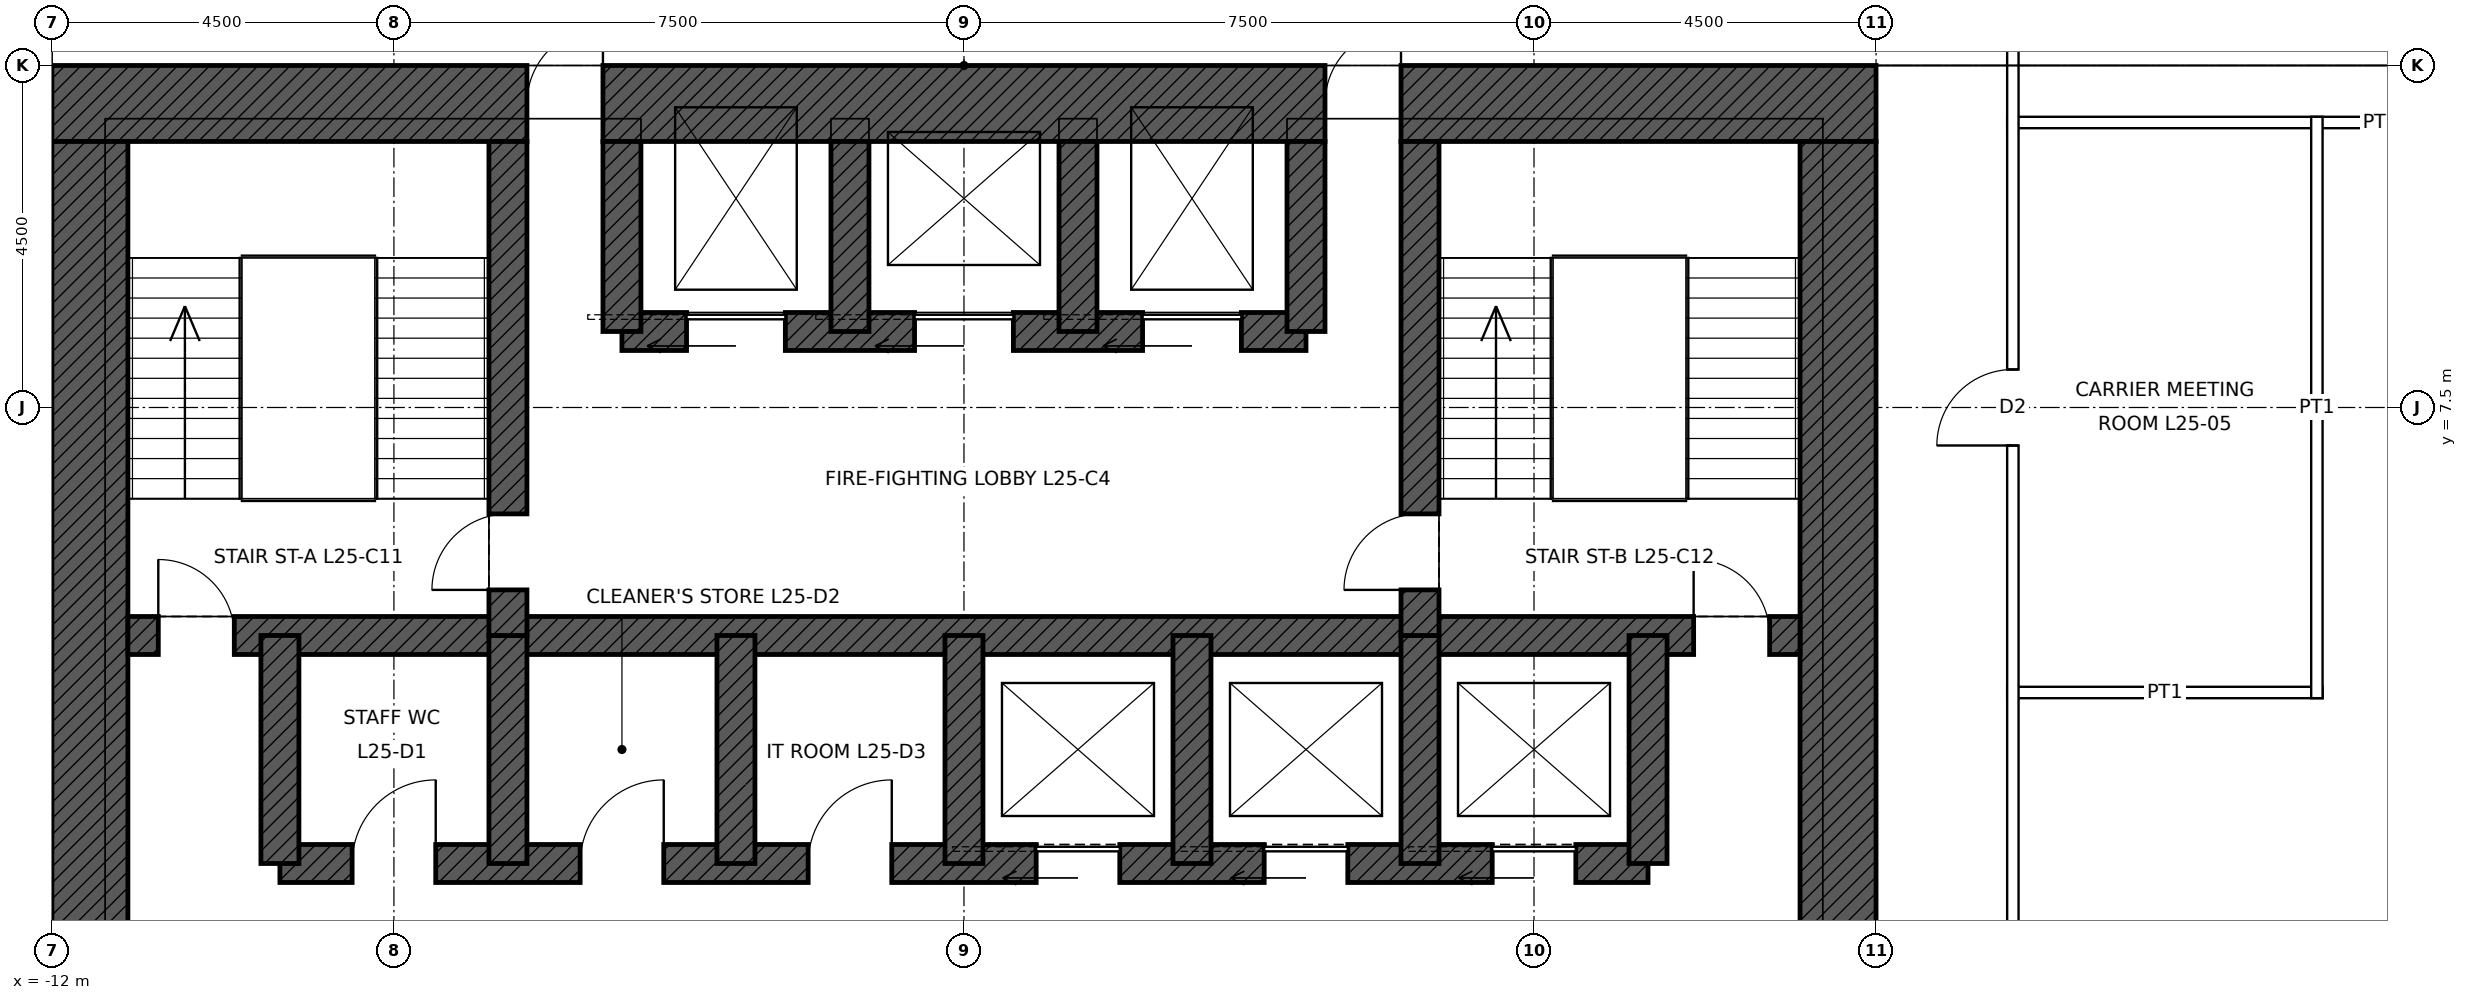
"""IFC4 building model, lengths in metres.
Left out: names, types, materials, properties, quantities, classifications, styles, units other than length and angle.
Written with IfcOpenShell. Run it as: python <this file> out.ifc"""

import sys

from ifc_helpers import new_model, si_unit, direction, frame, frame_2d, origin, place, context, subcontext, project, spatial, rectangle, extrude, element, fill, save


model = new_model("IFC4")
c1 = context("Model", 3, precision=1e-05, world=origin(), true_north=direction((0.0, 1.0)))
c2 = subcontext(c1, "Body", "Model", "MODEL_VIEW")
j1 = project(units=[si_unit("LENGTHUNIT", "METRE"), si_unit("PLANEANGLEUNIT", "RADIAN")], contexts=[c1])
p1 = place(None, origin())
s1 = spatial("IfcSite", under=j1, at=p1, CompositionType="ELEMENT")
p2 = place(p1, origin())
s2 = spatial("IfcBuilding", under=s1, at=p2, CompositionType="ELEMENT")
p3 = place(p2, frame((0.0, 0.0, 126.9)))
s3 = spatial("IfcBuildingStorey", under=s2, at=p3, CompositionType="ELEMENT", Elevation=126.9)
p4 = place(p3, frame((-12.0, 11.5, 0.0), z_axis=(0.0, 0.0, 1.0), x_axis=(1.0, 0.0, 0.0)))
e1 = element("IfcWall", 1, at=p4, inside=s3, PredefinedType="SHEAR", context=c2, shape_type="SweptSolid", body=[
    extrude(rectangle(XDim=24.0, YDim=1.0, at=frame_2d((12.0, 0.0))), origin(), (0.0, 0.0, 1.0), 4.5),
])
p5 = place(p4, frame((6.25, 0.0, 0.0)))
e2 = element("IfcOpeningElement", 2, at=p5, cuts=e1, PredefinedType="OPENING", context=c2, shape_type="SweptSolid", body=[
    extrude(rectangle(XDim=1.0, YDim=2.4, at=frame_2d((0.5, 1.2))), frame((0.0, 0.51, 0.0), z_axis=(0.0, -1.0, 0.0), x_axis=(1.0, 0.0, 0.0)), (0.0, 0.0, 1.0), 1.02),
])
p6 = place(p4, frame((16.75, 0.0, 0.0)))
e3 = element("IfcOpeningElement", 3, at=p6, cuts=e1, PredefinedType="OPENING", context=c2, shape_type="SweptSolid", body=[
    extrude(rectangle(XDim=1.0, YDim=2.4, at=frame_2d((0.5, 1.2))), frame((0.0, 0.51, 0.0), z_axis=(0.0, -1.0, 0.0), x_axis=(1.0, 0.0, 0.0)), (0.0, 0.0, 1.0), 1.02),
])
p7 = place(p3, frame((11.5, 11.0, 0.0), z_axis=(0.0, 0.0, 1.0), x_axis=(0.0, -1.0, 0.0)))
e4 = element("IfcWall", 4, at=p7, inside=s3, PredefinedType="SHEAR", context=c2, shape_type="SweptSolid", body=[
    extrude(rectangle(XDim=22.0, YDim=1.0, at=frame_2d((11.0, 0.0))), origin(), (0.0, 0.0, 1.0), 4.5),
])
p8 = place(p7, frame((10.5, 0.0, 0.0)))
e5 = element("IfcOpeningElement", 5, at=p8, cuts=e4, PredefinedType="OPENING", context=c2, shape_type="SweptSolid", body=[
    extrude(rectangle(XDim=1.0, YDim=2.4, at=frame_2d((0.5, 1.2))), frame((0.0, 0.51, 0.0), z_axis=(0.0, -1.0, 0.0), x_axis=(1.0, 0.0, 0.0)), (0.0, 0.0, 1.0), 1.02),
])
p9 = place(p3, frame((-11.5, -11.0, 0.0), z_axis=(0.0, 0.0, 1.0), x_axis=(0.0, 1.0, 0.0)))
e6 = element("IfcWall", 6, at=p9, inside=s3, PredefinedType="SHEAR", context=c2, shape_type="SweptSolid", body=[
    extrude(rectangle(XDim=22.0, YDim=1.0, at=frame_2d((11.0, 0.0))), origin(), (0.0, 0.0, 1.0), 4.5),
])
p10 = place(p9, frame((10.5, 0.0, 0.0)))
e7 = element("IfcOpeningElement", 7, at=p10, cuts=e6, PredefinedType="OPENING", context=c2, shape_type="SweptSolid", body=[
    extrude(rectangle(XDim=1.0, YDim=2.4, at=frame_2d((0.5, 1.2))), frame((0.0, 0.51, 0.0), z_axis=(0.0, -1.0, 0.0), x_axis=(1.0, 0.0, 0.0)), (0.0, 0.0, 1.0), 1.02),
])
p11 = place(p3, frame((-11.0, 4.5, 0.0), z_axis=(0.0, 0.0, 1.0), x_axis=(1.0, 0.0, 0.0)))
e8 = element("IfcWall", 8, at=p11, inside=s3, PredefinedType="SHEAR", context=c2, shape_type="SweptSolid", body=[
    extrude(rectangle(XDim=22.0, YDim=0.5, at=frame_2d((11.0, 0.0))), origin(), (0.0, 0.0, 1.0), 4.5),
])
p12 = place(p11, frame((0.4, 0.0, 0.0)))
e9 = element("IfcOpeningElement", 9, at=p12, cuts=e8, PredefinedType="OPENING", context=c2, shape_type="SweptSolid", body=[
    extrude(rectangle(XDim=1.0, YDim=2.1, at=frame_2d((0.5, 1.05))), frame((0.0, 0.26, 0.0), z_axis=(0.0, -1.0, 0.0), x_axis=(1.0, 0.0, 0.0)), (0.0, 0.0, 1.0), 0.52),
])
p13 = place(p11, frame((20.6, 0.0, 0.0)))
e10 = element("IfcOpeningElement", 10, at=p13, cuts=e8, PredefinedType="OPENING", context=c2, shape_type="SweptSolid", body=[
    extrude(rectangle(XDim=1.0, YDim=2.1, at=frame_2d((0.5, 1.05))), frame((0.0, 0.26, 0.0), z_axis=(0.0, -1.0, 0.0), x_axis=(1.0, 0.0, 0.0)), (0.0, 0.0, 1.0), 0.52),
])
p14 = place(p3, frame((-9.0, 1.5, 0.0), z_axis=(0.0, 0.0, 1.0), x_axis=(1.0, 0.0, 0.0)))
e11 = element("IfcWall", 11, at=p14, inside=s3, PredefinedType="SHEAR", context=c2, shape_type="SweptSolid", body=[
    extrude(rectangle(XDim=18.0, YDim=0.5, at=frame_2d((9.0, 0.0))), origin(), (0.0, 0.0, 1.0), 4.5),
])
p15 = place(p14, frame((9.95, 0.0, 0.0)))
e12 = element("IfcOpeningElement", 12, at=p15, cuts=e11, PredefinedType="OPENING", context=c2, shape_type="SweptSolid", body=[
    extrude(rectangle(XDim=1.1, YDim=2.1, at=frame_2d((0.55, 1.05))), frame((0.0, 0.26, 0.0), z_axis=(0.0, -1.0, 0.0), x_axis=(1.0, 0.0, 0.0)), (0.0, 0.0, 1.0), 0.52),
])
p16 = place(p14, frame((12.95, 0.0, 0.0)))
e13 = element("IfcOpeningElement", 13, at=p16, cuts=e11, PredefinedType="OPENING", context=c2, shape_type="SweptSolid", body=[
    extrude(rectangle(XDim=1.1, YDim=2.1, at=frame_2d((0.55, 1.05))), frame((0.0, 0.26, 0.0), z_axis=(0.0, -1.0, 0.0), x_axis=(1.0, 0.0, 0.0)), (0.0, 0.0, 1.0), 0.52),
])
p17 = place(p14, frame((15.95, 0.0, 0.0)))
e14 = element("IfcOpeningElement", 14, at=p17, cuts=e11, PredefinedType="OPENING", context=c2, shape_type="SweptSolid", body=[
    extrude(rectangle(XDim=1.1, YDim=2.1, at=frame_2d((0.55, 1.05))), frame((0.0, 0.26, 0.0), z_axis=(0.0, -1.0, 0.0), x_axis=(1.0, 0.0, 0.0)), (0.0, 0.0, 1.0), 0.52),
])
p18 = place(p14, frame((0.95, 0.0, 0.0)))
e15 = element("IfcOpeningElement", 15, at=p18, cuts=e11, PredefinedType="OPENING", context=c2, shape_type="SweptSolid", body=[
    extrude(rectangle(XDim=1.1, YDim=2.1, at=frame_2d((0.55, 1.05))), frame((0.0, 0.26, 0.0), z_axis=(0.0, -1.0, 0.0), x_axis=(1.0, 0.0, 0.0)), (0.0, 0.0, 1.0), 0.52),
])
p19 = place(p14, frame((3.95, 0.0, 0.0)))
e16 = element("IfcOpeningElement", 16, at=p19, cuts=e11, PredefinedType="OPENING", context=c2, shape_type="SweptSolid", body=[
    extrude(rectangle(XDim=1.1, YDim=2.1, at=frame_2d((0.55, 1.05))), frame((0.0, 0.26, 0.0), z_axis=(0.0, -1.0, 0.0), x_axis=(1.0, 0.0, 0.0)), (0.0, 0.0, 1.0), 0.52),
])
p20 = place(p14, frame((6.95, 0.0, 0.0)))
e17 = element("IfcOpeningElement", 17, at=p20, cuts=e11, PredefinedType="OPENING", context=c2, shape_type="SweptSolid", body=[
    extrude(rectangle(XDim=1.1, YDim=2.1, at=frame_2d((0.55, 1.05))), frame((0.0, 0.26, 0.0), z_axis=(0.0, -1.0, 0.0), x_axis=(1.0, 0.0, 0.0)), (0.0, 0.0, 1.0), 0.52),
])
p21 = place(p3, frame((-4.5, 8.5, 0.0), z_axis=(0.0, 0.0, 1.0), x_axis=(1.0, 0.0, 0.0)))
e18 = element("IfcWall", 18, at=p21, inside=s3, PredefinedType="SHEAR", context=c2, shape_type="SweptSolid", body=[
    extrude(rectangle(XDim=9.0, YDim=0.5, at=frame_2d((4.5, 0.0))), origin(), (0.0, 0.0, 1.0), 4.5),
])
p22 = place(p21, frame((0.85, 0.0, 0.0)))
e19 = element("IfcOpeningElement", 19, at=p22, cuts=e18, PredefinedType="OPENING", context=c2, shape_type="SweptSolid", body=[
    extrude(rectangle(XDim=1.3, YDim=2.4, at=frame_2d((0.65, 1.2))), frame((0.0, 0.26, 0.0), z_axis=(0.0, -1.0, 0.0), x_axis=(1.0, 0.0, 0.0)), (0.0, 0.0, 1.0), 0.52),
])
p23 = place(p21, frame((6.85, 0.0, 0.0)))
e20 = element("IfcOpeningElement", 20, at=p23, cuts=e18, PredefinedType="OPENING", context=c2, shape_type="SweptSolid", body=[
    extrude(rectangle(XDim=1.3, YDim=2.4, at=frame_2d((0.65, 1.2))), frame((0.0, 0.26, 0.0), z_axis=(0.0, -1.0, 0.0), x_axis=(1.0, 0.0, 0.0)), (0.0, 0.0, 1.0), 0.52),
])
p24 = place(p21, frame((3.85, 0.0, 0.0)))
e21 = element("IfcOpeningElement", 21, at=p24, cuts=e18, PredefinedType="OPENING", context=c2, shape_type="SweptSolid", body=[
    extrude(rectangle(XDim=1.3, YDim=2.4, at=frame_2d((0.65, 1.2))), frame((0.0, 0.26, 0.0), z_axis=(0.0, -1.0, 0.0), x_axis=(1.0, 0.0, 0.0)), (0.0, 0.0, 1.0), 0.52),
])
for number, where, z_axis, x_axis in (
    (22, (-9.0, 1.5, 0.0), (0.0, 0.0, 1.0), (0.0, 1.0, 0.0)),
    (23, (9.0, 1.5, 0.0), (0.0, 0.0, 1.0), (0.0, 1.0, 0.0)),
    (24, (-6.0, 1.5, 0.0), (0.0, 0.0, 1.0), (0.0, 1.0, 0.0)),
    (25, (-3.0, 1.5, 0.0), (0.0, 0.0, 1.0), (0.0, 1.0, 0.0)),
    (26, (0.0, 1.5, 0.0), (0.0, 0.0, 1.0), (0.0, 1.0, 0.0)),
    (27, (3.0, 1.5, 0.0), (0.0, 0.0, 1.0), (0.0, 1.0, 0.0)),
    (28, (6.0, 1.5, 0.0), (0.0, 0.0, 1.0), (0.0, 1.0, 0.0)),
):
    element("IfcWall", number, at=place(p3, frame(where, z_axis=z_axis, x_axis=x_axis)), inside=s3, PredefinedType="SHEAR", context=c2, shape_type="SweptSolid", body=[
        extrude(rectangle(XDim=3.0, YDim=0.5, at=frame_2d((1.5, 0.0))), origin(), (0.0, 0.0, 1.0), 4.5),
    ])
p25 = place(p3, frame((-6.0, 4.5, 0.0), z_axis=(0.0, 0.0, 1.0), x_axis=(0.0, 1.0, 0.0)))
e29 = element("IfcWall", 29, at=p25, inside=s3, PredefinedType="SHEAR", context=c2, shape_type="SweptSolid", body=[
    extrude(rectangle(XDim=6.5, YDim=0.5, at=frame_2d((3.25, 0.0))), origin(), (0.0, 0.0, 1.0), 4.5),
])
p26 = place(p25, frame((0.6, 0.0, 0.0)))
e30 = element("IfcOpeningElement", 30, at=p26, cuts=e29, PredefinedType="OPENING", context=c2, shape_type="SweptSolid", body=[
    extrude(rectangle(XDim=1.0, YDim=2.1, at=frame_2d((0.5, 1.05))), frame((0.0, 0.26, 0.0), z_axis=(0.0, -1.0, 0.0), x_axis=(1.0, 0.0, 0.0)), (0.0, 0.0, 1.0), 0.52),
])
p27 = place(p3, frame((6.0, 4.5, 0.0), z_axis=(0.0, 0.0, 1.0), x_axis=(0.0, 1.0, 0.0)))
e31 = element("IfcWall", 31, at=p27, inside=s3, PredefinedType="SHEAR", context=c2, shape_type="SweptSolid", body=[
    extrude(rectangle(XDim=6.5, YDim=0.5, at=frame_2d((3.25, 0.0))), origin(), (0.0, 0.0, 1.0), 4.5),
])
p28 = place(p27, frame((0.6, 0.0, 0.0)))
e32 = element("IfcOpeningElement", 32, at=p28, cuts=e31, PredefinedType="OPENING", context=c2, shape_type="SweptSolid", body=[
    extrude(rectangle(XDim=1.0, YDim=2.1, at=frame_2d((0.5, 1.05))), frame((0.0, 0.26, 0.0), z_axis=(0.0, -1.0, 0.0), x_axis=(1.0, 0.0, 0.0)), (0.0, 0.0, 1.0), 0.52),
])
for number, where, z_axis, x_axis in (
    (33, (-4.5, 8.5, 0.0), (0.0, 0.0, 1.0), (0.0, 1.0, 0.0)),
    (34, (4.5, 8.5, 0.0), (0.0, 0.0, 1.0), (0.0, 1.0, 0.0)),
    (35, (-1.5, 8.5, 0.0), (0.0, 0.0, 1.0), (0.0, 1.0, 0.0)),
    (36, (1.5, 8.5, 0.0), (0.0, 0.0, 1.0), (0.0, 1.0, 0.0)),
):
    element("IfcWall", number, at=place(p3, frame(where, z_axis=z_axis, x_axis=x_axis)), inside=s3, PredefinedType="SHEAR", context=c2, shape_type="SweptSolid", body=[
        extrude(rectangle(XDim=2.5, YDim=0.5, at=frame_2d((1.25, 0.0))), origin(), (0.0, 0.0, 1.0), 4.5),
    ])
p29 = place(p3, frame((13.725, 3.75, 0.0), z_axis=(0.0, 0.0, 1.0), x_axis=(1.0, 0.0, 0.0)))
e37 = element("IfcWall", 37, at=p29, inside=s3, PredefinedType="PARTITIONING", context=c2, shape_type="SweptSolid", body=[
    extrude(rectangle(XDim=4.15, YDim=0.15, at=frame_2d((2.075, 0.0))), origin(), (0.0, 0.0, 1.0), 3.431),
])
p30 = place(p3, frame((13.725, 11.25, 0.0), z_axis=(0.0, 0.0, 1.0), x_axis=(1.0, 0.0, 0.0)))
e38 = element("IfcWall", 38, at=p30, inside=s3, PredefinedType="PARTITIONING", context=c2, shape_type="SweptSolid", body=[
    extrude(rectangle(XDim=9.825, YDim=0.15, at=frame_2d((4.913, 0.0))), origin(), (0.0, 0.0, 1.0), 3.431),
])
p31 = place(p3, frame((13.8, -13.875, 0.0), z_axis=(0.0, 0.0, 1.0), x_axis=(0.0, 1.0, 0.0)))
e39 = element("IfcWall", 39, at=p31, inside=s3, PredefinedType="PARTITIONING", context=c2, shape_type="SweptSolid", body=[
    extrude(rectangle(XDim=27.75, YDim=0.15, at=frame_2d((13.875, 0.0))), origin(), (0.0, 0.0, 1.0), 4.3),
])
p32 = place(p31, frame((20.875, 0.0, 0.0)))
e40 = element("IfcOpeningElement", 40, at=p32, cuts=e39, PredefinedType="OPENING", context=c2, shape_type="SweptSolid", body=[
    extrude(rectangle(XDim=1.0, YDim=2.1, at=frame_2d((0.5, 1.05))), frame((0.0, 0.085, 0.0), z_axis=(0.0, -1.0, 0.0), x_axis=(1.0, 0.0, 0.0)), (0.0, 0.0, 1.0), 0.17),
])
p33 = place(p31, frame((9.225, 0.0, 0.0)))
e41 = element("IfcOpeningElement", 41, at=p33, cuts=e39, PredefinedType="OPENING", context=c2, shape_type="SweptSolid", body=[
    extrude(rectangle(XDim=1.8, YDim=2.4, at=frame_2d((0.9, 1.2))), frame((0.0, 0.085, 0.0), z_axis=(0.0, -1.0, 0.0), x_axis=(1.0, 0.0, 0.0)), (0.0, 0.0, 1.0), 0.17),
])
p34 = place(p3, frame((17.8, 3.675, 0.0), z_axis=(0.0, 0.0, 1.0), x_axis=(0.0, 1.0, 0.0)))
e42 = element("IfcWall", 42, at=p34, inside=s3, PredefinedType="PARTITIONING", context=c2, shape_type="SweptSolid", body=[
    extrude(rectangle(XDim=7.65, YDim=0.15, at=frame_2d((3.825, 0.0))), origin(), (0.0, 0.0, 1.0), 4.3),
])
p35 = place(p12, origin())
e43 = element("IfcDoor", 43, at=p35, inside=s3, OperationType="SINGLE_SWING_LEFT", PredefinedType="DOOR", context=c2, shape_type="SweptSolid", body=[
    extrude(rectangle(XDim=1.0, YDim=2.1, at=frame_2d((0.5, 1.05))), frame((0.0, 0.025, 0.0), z_axis=(0.0, -1.0, 0.0), x_axis=(1.0, 0.0, 0.0)), (0.0, 0.0, 1.0), 0.05),
])
fill(e9, e43)
p36 = place(p13, origin())
e44 = element("IfcDoor", 44, at=p36, inside=s3, OperationType="SINGLE_SWING_LEFT", PredefinedType="DOOR", context=c2, shape_type="SweptSolid", body=[
    extrude(rectangle(XDim=1.0, YDim=2.1, at=frame_2d((0.5, 1.05))), frame((0.0, 0.025, 0.0), z_axis=(0.0, -1.0, 0.0), x_axis=(1.0, 0.0, 0.0)), (0.0, 0.0, 1.0), 0.05),
])
fill(e10, e44)
p37 = place(p26, origin())
e45 = element("IfcDoor", 45, at=p37, inside=s3, OperationType="SINGLE_SWING_LEFT", PredefinedType="DOOR", context=c2, shape_type="SweptSolid", body=[
    extrude(rectangle(XDim=1.0, YDim=2.1, at=frame_2d((0.5, 1.05))), frame((0.0, 0.025, 0.0), z_axis=(0.0, -1.0, 0.0), x_axis=(1.0, 0.0, 0.0)), (0.0, 0.0, 1.0), 0.05),
])
fill(e30, e45)
p38 = place(p28, origin())
e46 = element("IfcDoor", 46, at=p38, inside=s3, OperationType="SINGLE_SWING_LEFT", PredefinedType="DOOR", context=c2, shape_type="SweptSolid", body=[
    extrude(rectangle(XDim=1.0, YDim=2.1, at=frame_2d((0.5, 1.05))), frame((0.0, 0.025, 0.0), z_axis=(0.0, -1.0, 0.0), x_axis=(1.0, 0.0, 0.0)), (0.0, 0.0, 1.0), 0.05),
])
fill(e32, e46)
p39 = place(p5, origin())
e47 = element("IfcDoor", 47, at=p39, inside=s3, OperationType="SINGLE_SWING_RIGHT", PredefinedType="DOOR", context=c2, shape_type="SweptSolid", body=[
    extrude(rectangle(XDim=1.0, YDim=2.4, at=frame_2d((0.5, 1.2))), frame((0.0, 0.485, 0.0), z_axis=(0.0, -1.0, 0.0), x_axis=(1.0, 0.0, 0.0)), (0.0, 0.0, 1.0), 0.05),
])
fill(e2, e47)
p40 = place(p6, origin())
e48 = element("IfcDoor", 48, at=p40, inside=s3, OperationType="SINGLE_SWING_RIGHT", PredefinedType="DOOR", context=c2, shape_type="SweptSolid", body=[
    extrude(rectangle(XDim=1.0, YDim=2.4, at=frame_2d((0.5, 1.2))), frame((0.0, 0.485, 0.0), z_axis=(0.0, -1.0, 0.0), x_axis=(1.0, 0.0, 0.0)), (0.0, 0.0, 1.0), 0.05),
])
fill(e3, e48)
p41 = place(p22, origin())
e49 = element("IfcDoor", 49, at=p41, inside=s3, OperationType="SLIDING_TO_LEFT", PredefinedType="DOOR", context=c2, shape_type="SweptSolid", body=[
    extrude(rectangle(XDim=1.3, YDim=2.4, at=frame_2d((0.65, 1.2))), frame((0.0, 0.025, 0.0), z_axis=(0.0, -1.0, 0.0), x_axis=(1.0, 0.0, 0.0)), (0.0, 0.0, 1.0), 0.05),
])
fill(e19, e49)
p42 = place(p23, origin())
e50 = element("IfcDoor", 50, at=p42, inside=s3, OperationType="SLIDING_TO_LEFT", PredefinedType="DOOR", context=c2, shape_type="SweptSolid", body=[
    extrude(rectangle(XDim=1.3, YDim=2.4, at=frame_2d((0.65, 1.2))), frame((0.0, 0.025, 0.0), z_axis=(0.0, -1.0, 0.0), x_axis=(1.0, 0.0, 0.0)), (0.0, 0.0, 1.0), 0.05),
])
fill(e20, e50)
p43 = place(p24, origin())
e51 = element("IfcDoor", 51, at=p43, inside=s3, OperationType="SLIDING_TO_LEFT", PredefinedType="DOOR", context=c2, shape_type="SweptSolid", body=[
    extrude(rectangle(XDim=1.3, YDim=2.4, at=frame_2d((0.65, 1.2))), frame((0.0, 0.025, 0.0), z_axis=(0.0, -1.0, 0.0), x_axis=(1.0, 0.0, 0.0)), (0.0, 0.0, 1.0), 0.05),
])
fill(e21, e51)
p44 = place(p15, origin())
e52 = element("IfcDoor", 52, at=p44, inside=s3, OperationType="SLIDING_TO_LEFT", PredefinedType="DOOR", context=c2, shape_type="SweptSolid", body=[
    extrude(rectangle(XDim=1.1, YDim=2.1, at=frame_2d((0.55, 1.05))), frame((0.0, 0.025, 0.0), z_axis=(0.0, -1.0, 0.0), x_axis=(1.0, 0.0, 0.0)), (0.0, 0.0, 1.0), 0.05),
])
fill(e12, e52)
p45 = place(p16, origin())
e53 = element("IfcDoor", 53, at=p45, inside=s3, OperationType="SLIDING_TO_LEFT", PredefinedType="DOOR", context=c2, shape_type="SweptSolid", body=[
    extrude(rectangle(XDim=1.1, YDim=2.1, at=frame_2d((0.55, 1.05))), frame((0.0, 0.025, 0.0), z_axis=(0.0, -1.0, 0.0), x_axis=(1.0, 0.0, 0.0)), (0.0, 0.0, 1.0), 0.05),
])
fill(e13, e53)
p46 = place(p17, origin())
e54 = element("IfcDoor", 54, at=p46, inside=s3, OperationType="SLIDING_TO_LEFT", PredefinedType="DOOR", context=c2, shape_type="SweptSolid", body=[
    extrude(rectangle(XDim=1.1, YDim=2.1, at=frame_2d((0.55, 1.05))), frame((0.0, 0.025, 0.0), z_axis=(0.0, -1.0, 0.0), x_axis=(1.0, 0.0, 0.0)), (0.0, 0.0, 1.0), 0.05),
])
fill(e14, e54)
p47 = place(p18, origin())
e55 = element("IfcDoor", 55, at=p47, inside=s3, OperationType="SINGLE_SWING_RIGHT", PredefinedType="DOOR", context=c2, shape_type="SweptSolid", body=[
    extrude(rectangle(XDim=1.1, YDim=2.1, at=frame_2d((0.55, 1.05))), frame((0.0, 0.025, 0.0), z_axis=(0.0, -1.0, 0.0), x_axis=(1.0, 0.0, 0.0)), (0.0, 0.0, 1.0), 0.05),
])
fill(e15, e55)
p48 = place(p19, origin())
e56 = element("IfcDoor", 56, at=p48, inside=s3, OperationType="SINGLE_SWING_RIGHT", PredefinedType="DOOR", context=c2, shape_type="SweptSolid", body=[
    extrude(rectangle(XDim=1.1, YDim=2.1, at=frame_2d((0.55, 1.05))), frame((0.0, 0.025, 0.0), z_axis=(0.0, -1.0, 0.0), x_axis=(1.0, 0.0, 0.0)), (0.0, 0.0, 1.0), 0.05),
])
fill(e16, e56)
p49 = place(p20, origin())
e57 = element("IfcDoor", 57, at=p49, inside=s3, OperationType="SINGLE_SWING_RIGHT", PredefinedType="DOOR", context=c2, shape_type="SweptSolid", body=[
    extrude(rectangle(XDim=1.1, YDim=2.1, at=frame_2d((0.55, 1.05))), frame((0.0, 0.025, 0.0), z_axis=(0.0, -1.0, 0.0), x_axis=(1.0, 0.0, 0.0)), (0.0, 0.0, 1.0), 0.05),
])
fill(e17, e57)
p50 = place(p32, origin())
e58 = element("IfcDoor", 58, at=p50, inside=s3, OperationType="SINGLE_SWING_LEFT", PredefinedType="DOOR", context=c2, shape_type="SweptSolid", body=[
    extrude(rectangle(XDim=1.0, YDim=2.1, at=frame_2d((0.5, 1.05))), frame((0.0, 0.025, 0.0), z_axis=(0.0, -1.0, 0.0), x_axis=(1.0, 0.0, 0.0)), (0.0, 0.0, 1.0), 0.05),
])
fill(e40, e58)
save(model, sys.argv[1])
